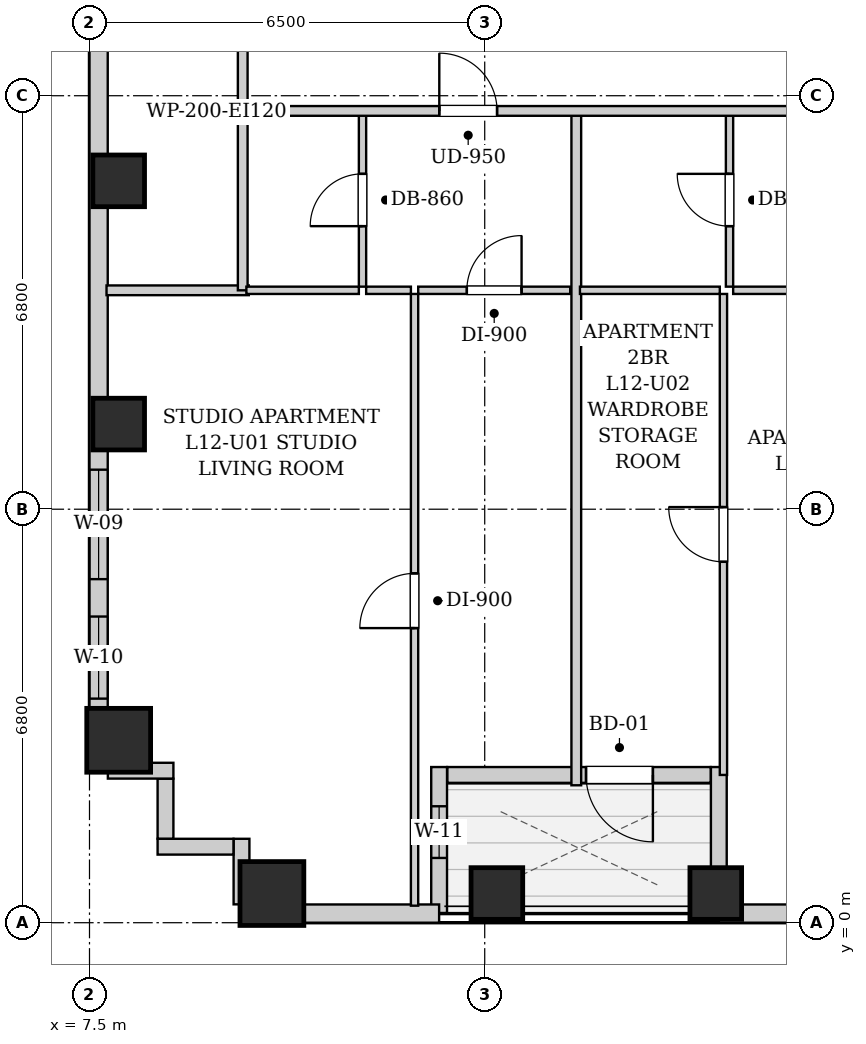
"""IFC4 building model, lengths in metres.
Left out: names, types, materials, properties, quantities, classifications, styles, units other than length and angle.
Written with IfcOpenShell. Run it as: python <this file> out.ifc"""

import sys

from ifc_helpers import new_model, si_unit, direction, frame, frame_2d, origin, origin_2d, place, context, subcontext, project, spatial, rectangle, extrude, element, fill, save


model = new_model("IFC4")
c1 = context("Model", 3, precision=1e-05, world=origin(), true_north=direction((0.0, 1.0)))
c2 = subcontext(c1, "Body", "Model", "MODEL_VIEW")
j1 = project(units=[si_unit("LENGTHUNIT", "METRE"), si_unit("PLANEANGLEUNIT", "RADIAN")], contexts=[c1])
p1 = place(None, origin())
s1 = spatial("IfcSite", under=j1, at=p1, CompositionType="ELEMENT")
p2 = place(p1, origin())
s2 = spatial("IfcBuilding", under=s1, at=p2, CompositionType="ELEMENT")
p3 = place(p2, frame((0.0, 0.0, 48.2)))
s3 = spatial("IfcBuildingStorey", under=s2, at=p3, CompositionType="ELEMENT", Elevation=48.2)
p4 = place(p3, frame((10.5, 0.48, 0.0), z_axis=(0.0, 0.0, 1.0), x_axis=(1.0, 0.0, 0.0)))
e1 = element("IfcColumn", 1, at=p4, inside=s3, PredefinedType="COLUMN", context=c2, shape_type="SweptSolid", body=[
    extrude(rectangle(XDim=1.05, YDim=1.05, at=origin_2d()), origin(), (0.0, 0.0, 1.0), 3.2),
])
for number, where, z_axis, x_axis in (
    (2, (14.2, 0.48, 0.0), (0.0, 0.0, 1.0), (1.0, 0.0, 0.0)),
    (3, (17.8, 0.48, 0.0), (0.0, 0.0, 1.0), (1.0, 0.0, 0.0)),
):
    element("IfcColumn", number, at=place(p3, frame(where, z_axis=z_axis, x_axis=x_axis)), inside=s3, PredefinedType="COLUMN", context=c2, shape_type="SweptSolid", body=[
        extrude(rectangle(XDim=0.85, YDim=0.85, at=origin_2d()), origin(), (0.0, 0.0, 1.0), 3.2),
    ])
p5 = place(p3, frame((7.98, 3.0, 0.0), z_axis=(0.0, 0.0, 1.0), x_axis=(1.0, 0.0, 0.0)))
e4 = element("IfcColumn", 4, at=p5, inside=s3, PredefinedType="COLUMN", context=c2, shape_type="SweptSolid", body=[
    extrude(rectangle(XDim=1.05, YDim=1.05, at=origin_2d()), origin(), (0.0, 0.0, 1.0), 3.2),
])
for number, where, z_axis, x_axis in (
    (5, (7.98, 8.2, 0.0), (0.0, 0.0, 1.0), (1.0, 0.0, 0.0)),
    (6, (7.98, 12.2, 0.0), (0.0, 0.0, 1.0), (1.0, 0.0, 0.0)),
):
    element("IfcColumn", number, at=place(p3, frame(where, z_axis=z_axis, x_axis=x_axis)), inside=s3, PredefinedType="COLUMN", context=c2, shape_type="SweptSolid", body=[
        extrude(rectangle(XDim=0.85, YDim=0.85, at=origin_2d()), origin(), (0.0, 0.0, 1.0), 3.2),
    ])
p6 = place(p3, frame((44.0, 0.15, 0.0), z_axis=(0.0, 0.0, 1.0), x_axis=(-1.0, 0.0, 0.0)))
e7 = element("IfcWall", 7, at=p6, inside=s3, PredefinedType="SOLIDWALL", context=c2, shape_type="SweptSolid", body=[
    extrude(rectangle(XDim=26.15, YDim=0.3, at=frame_2d((13.075, 0.0))), origin(), (0.0, 0.0, 1.0), 1.975),
])
p7 = place(p6, frame((22.47, 0.0, 0.55)))
e8 = element("IfcOpeningElement", 8, at=p7, cuts=e7, PredefinedType="OPENING", context=c2, shape_type="SweptSolid", body=[
    extrude(rectangle(XDim=1.8, YDim=1.2, at=frame_2d((0.9, 0.6))), frame((0.0, 0.16, 0.0), z_axis=(0.0, -1.0, 0.0), x_axis=(1.0, 0.0, 0.0)), (0.0, 0.0, 1.0), 0.32),
])
p8 = place(p6, frame((14.354, 0.0, 0.55)))
e9 = element("IfcOpeningElement", 9, at=p8, cuts=e7, PredefinedType="OPENING", context=c2, shape_type="SweptSolid", body=[
    extrude(rectangle(XDim=1.8, YDim=1.2, at=frame_2d((0.9, 0.6))), frame((0.0, 0.16, 0.0), z_axis=(0.0, -1.0, 0.0), x_axis=(1.0, 0.0, 0.0)), (0.0, 0.0, 1.0), 0.32),
])
p9 = place(p6, frame((11.385, 0.0, 0.55)))
e10 = element("IfcOpeningElement", 10, at=p9, cuts=e7, PredefinedType="OPENING", context=c2, shape_type="SweptSolid", body=[
    extrude(rectangle(XDim=1.35, YDim=1.2, at=frame_2d((0.675, 0.6))), frame((0.0, 0.16, 0.0), z_axis=(0.0, -1.0, 0.0), x_axis=(1.0, 0.0, 0.0)), (0.0, 0.0, 1.0), 0.32),
])
p10 = place(p6, frame((6.839, 0.0, 0.55)))
e11 = element("IfcOpeningElement", 11, at=p10, cuts=e7, PredefinedType="OPENING", context=c2, shape_type="SweptSolid", body=[
    extrude(rectangle(XDim=1.8, YDim=1.2, at=frame_2d((0.9, 0.6))), frame((0.0, 0.16, 0.0), z_axis=(0.0, -1.0, 0.0), x_axis=(1.0, 0.0, 0.0)), (0.0, 0.0, 1.0), 0.32),
])
p11 = place(p6, frame((2.332, 0.0, 0.55)))
e12 = element("IfcOpeningElement", 12, at=p11, cuts=e7, PredefinedType="OPENING", context=c2, shape_type="SweptSolid", body=[
    extrude(rectangle(XDim=1.8, YDim=1.2, at=frame_2d((0.9, 0.6))), frame((0.0, 0.16, 0.0), z_axis=(0.0, -1.0, 0.0), x_axis=(1.0, 0.0, 0.0)), (0.0, 0.0, 1.0), 0.32),
])
p12 = place(p3, frame((17.85, 0.16, 0.0), z_axis=(0.0, 0.0, 1.0), x_axis=(0.0, 1.0, 0.0)))
e13 = element("IfcWall", 13, at=p12, inside=s3, PredefinedType="SOLIDWALL", context=c2, shape_type="SweptSolid", body=[
    extrude(rectangle(XDim=2.4, YDim=0.26, at=frame_2d((1.2, 0.0))), origin(), (0.0, 0.0, 1.0), 2.232),
])
p13 = place(p3, frame((17.716, 2.43, 0.0), z_axis=(0.0, 0.0, 1.0), x_axis=(-1.0, 0.0, 0.0)))
e14 = element("IfcWall", 14, at=p13, inside=s3, PredefinedType="SOLIDWALL", context=c2, shape_type="SweptSolid", body=[
    extrude(rectangle(XDim=4.332, YDim=0.26, at=frame_2d((2.166, 0.0))), origin(), (0.0, 0.0, 1.0), 2.94),
])
p14 = place(p13, frame((0.95, 0.0, 0.0)))
e15 = element("IfcOpeningElement", 15, at=p14, cuts=e14, PredefinedType="OPENING", context=c2, shape_type="SweptSolid", body=[
    extrude(rectangle(XDim=1.1, YDim=2.0, at=frame_2d((0.55, 1.0))), frame((0.0, 0.14, 0.0), z_axis=(0.0, -1.0, 0.0), x_axis=(1.0, 0.0, 0.0)), (0.0, 0.0, 1.0), 0.28),
])
p15 = place(p3, frame((13.25, 2.56, 0.0), z_axis=(0.0, 0.0, 1.0), x_axis=(0.0, -1.0, 0.0)))
e16 = element("IfcWall", 16, at=p15, inside=s3, PredefinedType="SOLIDWALL", context=c2, shape_type="SweptSolid", body=[
    extrude(rectangle(XDim=2.4, YDim=0.26, at=frame_2d((1.2, 0.0))), origin(), (0.0, 0.0, 1.0), 2.94),
])
p16 = place(p15, frame((0.645, 0.0, 0.55)))
e17 = element("IfcOpeningElement", 17, at=p16, cuts=e16, PredefinedType="OPENING", context=c2, shape_type="SweptSolid", body=[
    extrude(rectangle(XDim=0.85, YDim=1.2, at=frame_2d((0.425, 0.6))), frame((0.0, 0.14, 0.0), z_axis=(0.0, -1.0, 0.0), x_axis=(1.0, 0.0, 0.0)), (0.0, 0.0, 1.0), 0.28),
])
p17 = place(p3, frame((13.25, 0.15, 0.0), z_axis=(0.0, 0.0, 1.0), x_axis=(-1.0, 0.0, 0.0)))
e18 = element("IfcWall", 18, at=p17, inside=s3, PredefinedType="SOLIDWALL", context=c2, shape_type="SweptSolid", body=[
    extrude(rectangle(XDim=3.25, YDim=0.3, at=frame_2d((1.625, 0.0))), origin(), (0.0, 0.0, 1.0), 1.975),
])
p18 = place(p3, frame((7.65, 2.5, 0.0), z_axis=(0.0, 0.0, 1.0), x_axis=(0.0, 1.0, 0.0)))
e19 = element("IfcWall", 19, at=p18, inside=s3, PredefinedType="SOLIDWALL", context=c2, shape_type="SweptSolid", body=[
    extrude(rectangle(XDim=42.6, YDim=0.3, at=frame_2d((21.3, 0.0))), origin(), (0.0, 0.0, 1.0), 1.975),
])
p19 = place(p18, frame((3.15, 0.0, 0.55)))
e20 = element("IfcOpeningElement", 20, at=p19, cuts=e19, PredefinedType="OPENING", context=c2, shape_type="SweptSolid", body=[
    extrude(rectangle(XDim=1.8, YDim=1.2, at=frame_2d((0.9, 0.6))), frame((0.0, 0.16, 0.0), z_axis=(0.0, -1.0, 0.0), x_axis=(1.0, 0.0, 0.0)), (0.0, 0.0, 1.0), 0.32),
])
p20 = place(p18, frame((1.185, 0.0, 0.55)))
e21 = element("IfcOpeningElement", 21, at=p20, cuts=e19, PredefinedType="OPENING", context=c2, shape_type="SweptSolid", body=[
    extrude(rectangle(XDim=1.35, YDim=1.2, at=frame_2d((0.675, 0.6))), frame((0.0, 0.16, 0.0), z_axis=(0.0, -1.0, 0.0), x_axis=(1.0, 0.0, 0.0)), (0.0, 0.0, 1.0), 0.32),
])
p21 = place(p18, frame((37.085, 0.0, 0.55)))
e22 = element("IfcOpeningElement", 22, at=p21, cuts=e19, PredefinedType="OPENING", context=c2, shape_type="SweptSolid", body=[
    extrude(rectangle(XDim=1.8, YDim=1.2, at=frame_2d((0.9, 0.6))), frame((0.0, 0.16, 0.0), z_axis=(0.0, -1.0, 0.0), x_axis=(1.0, 0.0, 0.0)), (0.0, 0.0, 1.0), 0.32),
])
p22 = place(p18, frame((31.55, 0.0, 0.55)))
e23 = element("IfcOpeningElement", 23, at=p22, cuts=e19, PredefinedType="OPENING", context=c2, shape_type="SweptSolid", body=[
    extrude(rectangle(XDim=1.35, YDim=1.2, at=frame_2d((0.675, 0.6))), frame((0.0, 0.16, 0.0), z_axis=(0.0, -1.0, 0.0), x_axis=(1.0, 0.0, 0.0)), (0.0, 0.0, 1.0), 0.32),
])
p23 = place(p18, frame((13.95, 0.0, 0.55)))
e24 = element("IfcOpeningElement", 24, at=p23, cuts=e19, PredefinedType="OPENING", context=c2, shape_type="SweptSolid", body=[
    extrude(rectangle(XDim=1.8, YDim=1.2, at=frame_2d((0.9, 0.6))), frame((0.0, 0.16, 0.0), z_axis=(0.0, -1.0, 0.0), x_axis=(1.0, 0.0, 0.0)), (0.0, 0.0, 1.0), 0.32),
])
p24 = place(p18, frame((23.325, 0.0, 0.55)))
e25 = element("IfcOpeningElement", 25, at=p24, cuts=e19, PredefinedType="OPENING", context=c2, shape_type="SweptSolid", body=[
    extrude(rectangle(XDim=1.8, YDim=1.2, at=frame_2d((0.9, 0.6))), frame((0.0, 0.16, 0.0), z_axis=(0.0, -1.0, 0.0), x_axis=(1.0, 0.0, 0.0)), (0.0, 0.0, 1.0), 0.32),
])
p25 = place(p3, frame((10.0, 0.302, 0.0), z_axis=(0.0, 0.0, 1.0), x_axis=(0.0, 1.0, 0.0)))
e26 = element("IfcWall", 26, at=p25, inside=s3, PredefinedType="SOLIDWALL", context=c2, shape_type="SweptSolid", body=[
    extrude(rectangle(XDim=1.078, YDim=0.26, at=frame_2d((0.539, 0.0))), origin(), (0.0, 0.0, 1.0), 2.94),
])
p26 = place(p3, frame((9.868, 1.25, 0.0), z_axis=(0.0, 0.0, 1.0), x_axis=(-1.0, 0.0, 0.0)))
e27 = element("IfcWall", 27, at=p26, inside=s3, PredefinedType="SOLIDWALL", context=c2, shape_type="SweptSolid", body=[
    extrude(rectangle(XDim=1.248, YDim=0.26, at=frame_2d((0.624, 0.0))), origin(), (0.0, 0.0, 1.0), 2.94),
])
p27 = place(p3, frame((8.75, 1.382, 0.0), z_axis=(0.0, 0.0, 1.0), x_axis=(0.0, 1.0, 0.0)))
e28 = element("IfcWall", 28, at=p27, inside=s3, PredefinedType="SOLIDWALL", context=c2, shape_type="SweptSolid", body=[
    extrude(rectangle(XDim=0.986, YDim=0.26, at=frame_2d((0.493, 0.0))), origin(), (0.0, 0.0, 1.0), 2.94),
])
p28 = place(p3, frame((8.88, 2.5, 0.0), z_axis=(0.0, 0.0, 1.0), x_axis=(-1.0, 0.0, 0.0)))
e29 = element("IfcWall", 29, at=p28, inside=s3, PredefinedType="SOLIDWALL", context=c2, shape_type="SweptSolid", body=[
    extrude(rectangle(XDim=1.078, YDim=0.26, at=frame_2d((0.539, 0.0))), origin(), (0.0, 0.0, 1.0), 2.94),
])
p29 = place(p3, frame((10.02, 13.35, 0.0), z_axis=(0.0, 0.0, 1.0), x_axis=(0.0, 1.0, 0.0)))
e30 = element("IfcWall", 30, at=p29, inside=s3, PredefinedType="PARTITIONING", context=c2, shape_type="SweptSolid", body=[
    extrude(rectangle(XDim=1.74, YDim=0.16, at=frame_2d((0.87, 0.0))), origin(), (0.0, 0.0, 1.0), 2.94),
])
p30 = place(p3, frame((7.78, 10.4, 0.0), z_axis=(0.0, 0.0, 1.0), x_axis=(1.0, 0.0, 0.0)))
e31 = element("IfcWall", 31, at=p30, inside=s3, PredefinedType="PARTITIONING", context=c2, shape_type="SweptSolid", body=[
    extrude(rectangle(XDim=2.34, YDim=0.16, at=frame_2d((1.17, 0.0))), origin(), (0.0, 0.0, 1.0), 2.94),
])
p31 = place(p3, frame((10.02, 10.4, 0.0), z_axis=(0.0, 0.0, 1.0), x_axis=(0.0, 1.0, 0.0)))
e32 = element("IfcWall", 32, at=p31, inside=s3, PredefinedType="PARTITIONING", context=c2, shape_type="SweptSolid", body=[
    extrude(rectangle(XDim=2.91, YDim=0.16, at=frame_2d((1.455, 0.0))), origin(), (0.0, 0.0, 1.0), 2.94),
])
p32 = place(p3, frame((11.99, 10.46, 0.0), z_axis=(0.0, 0.0, 1.0), x_axis=(0.0, 1.0, 0.0)))
e33 = element("IfcWall", 33, at=p32, inside=s3, PredefinedType="PARTITIONING", context=c2, shape_type="SweptSolid", body=[
    extrude(rectangle(XDim=2.85, YDim=0.12, at=frame_2d((1.425, 0.0))), origin(), (0.0, 0.0, 1.0), 2.94),
])
p33 = place(p32, frame((0.995, 0.0, 0.0)))
e34 = element("IfcOpeningElement", 34, at=p33, cuts=e33, PredefinedType="OPENING", context=c2, shape_type="SweptSolid", body=[
    extrude(rectangle(XDim=0.86, YDim=2.05, at=frame_2d((0.43, 1.025))), frame((0.0, 0.07, 0.0), z_axis=(0.0, -1.0, 0.0), x_axis=(1.0, 0.0, 0.0)), (0.0, 0.0, 1.0), 0.14),
])
p34 = place(p3, frame((10.08, 10.4, 0.0), z_axis=(0.0, 0.0, 1.0), x_axis=(1.0, 0.0, 0.0)))
e35 = element("IfcWall", 35, at=p34, inside=s3, PredefinedType="PARTITIONING", context=c2, shape_type="SweptSolid", body=[
    extrude(rectangle(XDim=1.85, YDim=0.12, at=frame_2d((0.925, 0.0))), origin(), (0.0, 0.0, 1.0), 2.94),
])
p35 = place(p3, frame((12.05, 10.4, 0.0), z_axis=(0.0, 0.0, 1.0), x_axis=(1.0, 0.0, 0.0)))
e36 = element("IfcWall", 36, at=p35, inside=s3, PredefinedType="PARTITIONING", context=c2, shape_type="SweptSolid", body=[
    extrude(rectangle(XDim=0.736, YDim=0.12, at=frame_2d((0.368, 0.0))), origin(), (0.0, 0.0, 1.0), 2.94),
])
p36 = place(p3, frame((12.906, 10.4, 0.0), z_axis=(0.0, 0.0, 1.0), x_axis=(1.0, 0.0, 0.0)))
e37 = element("IfcWall", 37, at=p36, inside=s3, PredefinedType="PARTITIONING", context=c2, shape_type="SweptSolid", body=[
    extrude(rectangle(XDim=2.5, YDim=0.12, at=frame_2d((1.25, 0.0))), origin(), (0.0, 0.0, 1.0), 2.94),
])
p37 = place(p36, frame((0.8, 0.0, 0.0)))
e38 = element("IfcOpeningElement", 38, at=p37, cuts=e37, PredefinedType="OPENING", context=c2, shape_type="SweptSolid", body=[
    extrude(rectangle(XDim=0.9, YDim=2.05, at=frame_2d((0.45, 1.025))), frame((0.0, 0.07, 0.0), z_axis=(0.0, -1.0, 0.0), x_axis=(1.0, 0.0, 0.0)), (0.0, 0.0, 1.0), 0.14),
])
p38 = place(p3, frame((12.846, 0.28, 0.0), z_axis=(0.0, 0.0, 1.0), x_axis=(0.0, 1.0, 0.0)))
e39 = element("IfcWall", 39, at=p38, inside=s3, PredefinedType="PARTITIONING", context=c2, shape_type="SweptSolid", body=[
    extrude(rectangle(XDim=10.06, YDim=0.12, at=frame_2d((5.03, 0.0))), origin(), (0.0, 0.0, 1.0), 2.94),
])
p39 = place(p38, frame((4.565, 0.0, 0.0)))
e40 = element("IfcOpeningElement", 40, at=p39, cuts=e39, PredefinedType="OPENING", context=c2, shape_type="SweptSolid", body=[
    extrude(rectangle(XDim=0.9, YDim=2.05, at=frame_2d((0.45, 1.025))), frame((0.0, 0.07, 0.0), z_axis=(0.0, -1.0, 0.0), x_axis=(1.0, 0.0, 0.0)), (0.0, 0.0, 1.0), 0.14),
])
p40 = place(p3, frame((15.506, 2.26, 0.0), z_axis=(0.0, 0.0, 1.0), x_axis=(0.0, 1.0, 0.0)))
e41 = element("IfcWall", 41, at=p40, inside=s3, PredefinedType="PARTITIONING", context=c2, shape_type="SweptSolid", body=[
    extrude(rectangle(XDim=11.05, YDim=0.16, at=frame_2d((5.525, 0.0))), origin(), (0.0, 0.0, 1.0), 2.94),
])
p41 = place(p3, frame((18.026, 10.46, 0.0), z_axis=(0.0, 0.0, 1.0), x_axis=(0.0, 1.0, 0.0)))
e42 = element("IfcWall", 42, at=p41, inside=s3, PredefinedType="PARTITIONING", context=c2, shape_type="SweptSolid", body=[
    extrude(rectangle(XDim=2.85, YDim=0.12, at=frame_2d((1.425, 0.0))), origin(), (0.0, 0.0, 1.0), 2.94),
])
p42 = place(p41, frame((0.995, 0.0, 0.0)))
e43 = element("IfcOpeningElement", 43, at=p42, cuts=e42, PredefinedType="OPENING", context=c2, shape_type="SweptSolid", body=[
    extrude(rectangle(XDim=0.86, YDim=2.05, at=frame_2d((0.43, 1.025))), frame((0.0, 0.07, 0.0), z_axis=(0.0, -1.0, 0.0), x_axis=(1.0, 0.0, 0.0)), (0.0, 0.0, 1.0), 0.14),
])
p43 = place(p3, frame((15.566, 10.4, 0.0), z_axis=(0.0, 0.0, 1.0), x_axis=(1.0, 0.0, 0.0)))
e44 = element("IfcWall", 44, at=p43, inside=s3, PredefinedType="PARTITIONING", context=c2, shape_type="SweptSolid", body=[
    extrude(rectangle(XDim=2.3, YDim=0.12, at=frame_2d((1.15, 0.0))), origin(), (0.0, 0.0, 1.0), 2.94),
])
p44 = place(p3, frame((18.086, 10.4, 0.0), z_axis=(0.0, 0.0, 1.0), x_axis=(1.0, 0.0, 0.0)))
e45 = element("IfcWall", 45, at=p44, inside=s3, PredefinedType="PARTITIONING", context=c2, shape_type="SweptSolid", body=[
    extrude(rectangle(XDim=4.44, YDim=0.12, at=frame_2d((2.22, 0.0))), origin(), (0.0, 0.0, 1.0), 2.94),
])
p45 = place(p44, frame((1.77, 0.0, 0.0)))
e46 = element("IfcOpeningElement", 46, at=p45, cuts=e45, PredefinedType="OPENING", context=c2, shape_type="SweptSolid", body=[
    extrude(rectangle(XDim=0.9, YDim=2.05, at=frame_2d((0.45, 1.025))), frame((0.0, 0.07, 0.0), z_axis=(0.0, -1.0, 0.0), x_axis=(1.0, 0.0, 0.0)), (0.0, 0.0, 1.0), 0.14),
])
p46 = place(p3, frame((17.926, 2.43, 0.0), z_axis=(0.0, 0.0, 1.0), x_axis=(0.0, 1.0, 0.0)))
e47 = element("IfcWall", 47, at=p46, inside=s3, PredefinedType="PARTITIONING", context=c2, shape_type="SweptSolid", body=[
    extrude(rectangle(XDim=7.91, YDim=0.12, at=frame_2d((3.955, 0.0))), origin(), (0.0, 0.0, 1.0), 2.232),
])
p47 = place(p46, frame((3.505, 0.0, 0.0)))
e48 = element("IfcOpeningElement", 48, at=p47, cuts=e47, PredefinedType="OPENING", context=c2, shape_type="SweptSolid", body=[
    extrude(rectangle(XDim=0.9, YDim=2.05, at=frame_2d((0.45, 1.025))), frame((0.0, 0.07, 0.0), z_axis=(0.0, -1.0, 0.0), x_axis=(1.0, 0.0, 0.0)), (0.0, 0.0, 1.0), 0.14),
])
p48 = place(p3, frame((10.05, 13.35, 0.0), z_axis=(0.0, 0.0, 1.0), x_axis=(1.0, 0.0, 0.0)))
e49 = element("IfcWall", 49, at=p48, inside=s3, PredefinedType="PARTITIONING", context=c2, shape_type="SweptSolid", body=[
    extrude(rectangle(XDim=33.9, YDim=0.16, at=frame_2d((16.95, 0.0))), origin(), (0.0, 0.0, 1.0), 2.94),
])
p49 = place(p48, frame((3.203, 0.0, 0.0)))
e50 = element("IfcOpeningElement", 50, at=p49, cuts=e49, PredefinedType="OPENING", context=c2, shape_type="SweptSolid", body=[
    extrude(rectangle(XDim=0.95, YDim=2.1, at=frame_2d((0.475, 1.05))), frame((0.0, 0.09, 0.0), z_axis=(0.0, -1.0, 0.0), x_axis=(1.0, 0.0, 0.0)), (0.0, 0.0, 1.0), 0.18),
])
p50 = place(p48, frame((9.39, 0.0, 0.0)))
e51 = element("IfcOpeningElement", 51, at=p50, cuts=e49, PredefinedType="OPENING", context=c2, shape_type="SweptSolid", body=[
    extrude(rectangle(XDim=0.95, YDim=2.1, at=frame_2d((0.475, 1.05))), frame((0.0, 0.09, 0.0), z_axis=(0.0, -1.0, 0.0), x_axis=(1.0, 0.0, 0.0)), (0.0, 0.0, 1.0), 0.18),
])
p51 = place(p48, frame((28.476, 0.0, 0.0)))
e52 = element("IfcOpeningElement", 52, at=p51, cuts=e49, PredefinedType="OPENING", context=c2, shape_type="SweptSolid", body=[
    extrude(rectangle(XDim=0.95, YDim=2.1, at=frame_2d((0.475, 1.05))), frame((0.0, 0.09, 0.0), z_axis=(0.0, -1.0, 0.0), x_axis=(1.0, 0.0, 0.0)), (0.0, 0.0, 1.0), 0.18),
])
p52 = place(p33, origin())
e53 = element("IfcDoor", 53, at=p52, inside=s3, OperationType="SINGLE_SWING_LEFT", PredefinedType="DOOR", context=c2, shape_type="SweptSolid", body=[
    extrude(rectangle(XDim=0.86, YDim=2.05, at=frame_2d((0.43, 1.025))), frame((0.0, 0.025, 0.0), z_axis=(0.0, -1.0, 0.0), x_axis=(1.0, 0.0, 0.0)), (0.0, 0.0, 1.0), 0.05),
])
fill(e34, e53)
p53 = place(p37, origin())
e54 = element("IfcDoor", 54, at=p53, inside=s3, OperationType="SINGLE_SWING_RIGHT", PredefinedType="DOOR", context=c2, shape_type="SweptSolid", body=[
    extrude(rectangle(XDim=0.9, YDim=2.05, at=frame_2d((0.45, 1.025))), frame((0.0, 0.025, 0.0), z_axis=(0.0, -1.0, 0.0), x_axis=(1.0, 0.0, 0.0)), (0.0, 0.0, 1.0), 0.05),
])
fill(e38, e54)
p54 = place(p39, origin())
e55 = element("IfcDoor", 55, at=p54, inside=s3, OperationType="SINGLE_SWING_LEFT", PredefinedType="DOOR", context=c2, shape_type="SweptSolid", body=[
    extrude(rectangle(XDim=0.9, YDim=2.05, at=frame_2d((0.45, 1.025))), frame((0.0, 0.025, 0.0), z_axis=(0.0, -1.0, 0.0), x_axis=(1.0, 0.0, 0.0)), (0.0, 0.0, 1.0), 0.05),
])
fill(e40, e55)
p55 = place(p42, origin())
e56 = element("IfcDoor", 56, at=p55, inside=s3, OperationType="SINGLE_SWING_RIGHT", PredefinedType="DOOR", context=c2, shape_type="SweptSolid", body=[
    extrude(rectangle(XDim=0.86, YDim=2.05, at=frame_2d((0.43, 1.025))), frame((0.0, 0.025, 0.0), z_axis=(0.0, -1.0, 0.0), x_axis=(1.0, 0.0, 0.0)), (0.0, 0.0, 1.0), 0.05),
])
fill(e43, e56)
p56 = place(p47, origin())
e57 = element("IfcDoor", 57, at=p56, inside=s3, OperationType="SINGLE_SWING_RIGHT", PredefinedType="DOOR", context=c2, shape_type="SweptSolid", body=[
    extrude(rectangle(XDim=0.9, YDim=2.05, at=frame_2d((0.45, 1.025))), frame((0.0, 0.025, 0.0), z_axis=(0.0, -1.0, 0.0), x_axis=(1.0, 0.0, 0.0)), (0.0, 0.0, 1.0), 0.05),
])
fill(e48, e57)
p57 = place(p49, origin())
e58 = element("IfcDoor", 58, at=p57, inside=s3, OperationType="SINGLE_SWING_LEFT", PredefinedType="DOOR", context=c2, shape_type="SweptSolid", body=[
    extrude(rectangle(XDim=0.95, YDim=2.1, at=frame_2d((0.475, 1.05))), frame((0.0, 0.025, 0.0), z_axis=(0.0, -1.0, 0.0), x_axis=(1.0, 0.0, 0.0)), (0.0, 0.0, 1.0), 0.05),
])
fill(e50, e58)
p58 = place(p14, origin())
e59 = element("IfcDoor", 59, at=p58, inside=s3, OperationType="SINGLE_SWING_LEFT", PredefinedType="DOOR", context=c2, shape_type="SweptSolid", body=[
    extrude(rectangle(XDim=1.1, YDim=2.0, at=frame_2d((0.55, 1.0))), frame((0.0, 0.025, 0.0), z_axis=(0.0, -1.0, 0.0), x_axis=(1.0, 0.0, 0.0)), (0.0, 0.0, 1.0), 0.05),
])
fill(e15, e59)
p59 = place(p19, origin())
e60 = element("IfcWindow", 60, at=p59, inside=s3, PartitioningType="DOUBLE_PANEL_VERTICAL", PredefinedType="WINDOW", context=c2, shape_type="SweptSolid", body=[
    extrude(rectangle(XDim=1.8, YDim=1.2, at=frame_2d((0.9, 0.6))), frame((0.0, 0.03, 0.0), z_axis=(0.0, -1.0, 0.0), x_axis=(1.0, 0.0, 0.0)), (0.0, 0.0, 1.0), 0.06),
])
fill(e20, e60)
p60 = place(p20, origin())
e61 = element("IfcWindow", 61, at=p60, inside=s3, PartitioningType="SINGLE_PANEL", PredefinedType="WINDOW", context=c2, shape_type="SweptSolid", body=[
    extrude(rectangle(XDim=1.35, YDim=1.2, at=frame_2d((0.675, 0.6))), frame((0.0, 0.03, 0.0), z_axis=(0.0, -1.0, 0.0), x_axis=(1.0, 0.0, 0.0)), (0.0, 0.0, 1.0), 0.06),
])
fill(e21, e61)
p61 = place(p16, origin())
e62 = element("IfcWindow", 62, at=p61, inside=s3, PartitioningType="SINGLE_PANEL", PredefinedType="WINDOW", context=c2, shape_type="SweptSolid", body=[
    extrude(rectangle(XDim=0.85, YDim=1.2, at=frame_2d((0.425, 0.6))), frame((0.0, 0.03, 0.0), z_axis=(0.0, -1.0, 0.0), x_axis=(1.0, 0.0, 0.0)), (0.0, 0.0, 1.0), 0.06),
])
fill(e17, e62)
save(model, sys.argv[1])
